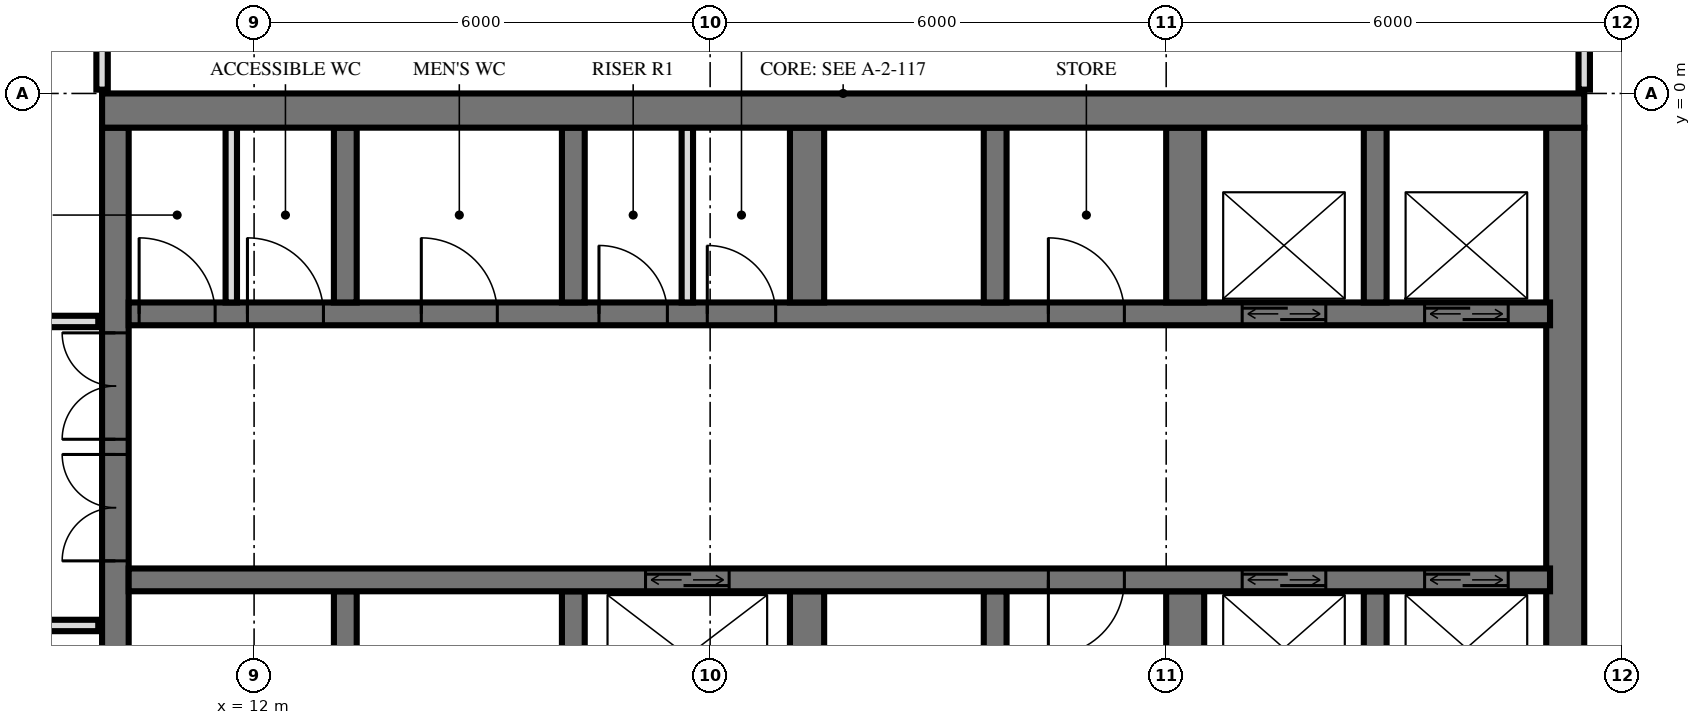
"""IFC4 building model, lengths in metres.
Left out: names, types, materials, properties, quantities, classifications, styles, units other than length and angle.
Written with IfcOpenShell. Run it as: python <this file> out.ifc"""

import sys

from ifc_helpers import new_model, si_unit, direction, frame, frame_2d, origin, place, context, subcontext, project, spatial, rectangle, extrude, element, fill, save


model = new_model("IFC4")
c1 = context("Model", 3, precision=1e-05, world=origin(), true_north=direction((0.0, 1.0)))
c2 = subcontext(c1, "Body", "Model", "MODEL_VIEW")
j1 = project(units=[si_unit("LENGTHUNIT", "METRE"), si_unit("PLANEANGLEUNIT", "RADIAN")], contexts=[c1])
p1 = place(None, origin())
s1 = spatial("IfcSite", under=j1, at=p1, CompositionType="ELEMENT")
p2 = place(p1, origin())
s2 = spatial("IfcBuilding", under=s1, at=p2, CompositionType="ELEMENT")
p3 = place(p2, frame((0.0, 0.0, 24.0)))
s3 = spatial("IfcBuildingStorey", under=s2, at=p3, CompositionType="ELEMENT", Elevation=24.0)
p4 = place(p3, frame((10.0, -0.225, 0.0), z_axis=(0.0, 0.0, 1.0), x_axis=(1.0, 0.0, 0.0)))
e1 = element("IfcWall", 1, at=p4, inside=s3, PredefinedType="SHEAR", context=c2, shape_type="SweptSolid", body=[
    extrude(rectangle(XDim=19.5, YDim=0.45, at=frame_2d((9.75, 0.0))), origin(), (0.0, 0.0, 1.0), 3.6),
])
p5 = place(p3, frame((10.175, -14.55, 0.0), z_axis=(0.0, 0.0, 1.0), x_axis=(0.0, 1.0, 0.0)))
e2 = element("IfcWall", 2, at=p5, inside=s3, PredefinedType="SHEAR", context=c2, shape_type="SweptSolid", body=[
    extrude(rectangle(XDim=14.1, YDim=0.35, at=frame_2d((7.05, 0.0))), origin(), (0.0, 0.0, 1.0), 3.6),
])
p6 = place(p5, frame((8.4, 0.0, 0.0)))
e3 = element("IfcOpeningElement", 3, at=p6, cuts=e2, PredefinedType="OPENING", context=c2, shape_type="SweptSolid", body=[
    extrude(rectangle(XDim=1.4, YDim=2.4, at=frame_2d((0.7, 1.2))), frame((0.0, 0.185, 0.0), z_axis=(0.0, -1.0, 0.0), x_axis=(1.0, 0.0, 0.0)), (0.0, 0.0, 1.0), 0.37),
])
p7 = place(p5, frame((10.0, 0.0, 0.0)))
e4 = element("IfcOpeningElement", 4, at=p7, cuts=e2, PredefinedType="OPENING", context=c2, shape_type="SweptSolid", body=[
    extrude(rectangle(XDim=1.4, YDim=2.4, at=frame_2d((0.7, 1.2))), frame((0.0, 0.185, 0.0), z_axis=(0.0, -1.0, 0.0), x_axis=(1.0, 0.0, 0.0)), (0.0, 0.0, 1.0), 0.37),
])
p8 = place(p5, frame((4.0, 0.0, 0.0)))
e5 = element("IfcOpeningElement", 5, at=p8, cuts=e2, PredefinedType="OPENING", context=c2, shape_type="SweptSolid", body=[
    extrude(rectangle(XDim=1.2, YDim=2.1, at=frame_2d((0.6, 1.05))), frame((0.0, 0.185, 0.0), z_axis=(0.0, -1.0, 0.0), x_axis=(1.0, 0.0, 0.0)), (0.0, 0.0, 1.0), 0.37),
])
p9 = place(p3, frame((29.25, -14.55, 0.0), z_axis=(0.0, 0.0, 1.0), x_axis=(0.0, 1.0, 0.0)))
e6 = element("IfcWall", 6, at=p9, inside=s3, PredefinedType="SHEAR", context=c2, shape_type="SweptSolid", body=[
    extrude(rectangle(XDim=14.1, YDim=0.5, at=frame_2d((7.05, 0.0))), origin(), (0.0, 0.0, 1.0), 3.6),
])
p10 = place(p3, frame((10.35, -2.9, 0.0), z_axis=(0.0, 0.0, 1.0), x_axis=(1.0, 0.0, 0.0)))
e7 = element("IfcWall", 7, at=p10, inside=s3, PredefinedType="SHEAR", context=c2, shape_type="SweptSolid", body=[
    extrude(rectangle(XDim=18.7, YDim=0.3, at=frame_2d((9.35, 0.0))), origin(), (0.0, 0.0, 1.0), 3.6),
])
p11 = place(p10, frame((14.65, 0.0, 0.0)))
e8 = element("IfcOpeningElement", 8, at=p11, cuts=e7, PredefinedType="OPENING", context=c2, shape_type="SweptSolid", body=[
    extrude(rectangle(XDim=1.1, YDim=2.1, at=frame_2d((0.55, 1.05))), frame((0.0, 0.16, 0.0), z_axis=(0.0, -1.0, 0.0), x_axis=(1.0, 0.0, 0.0)), (0.0, 0.0, 1.0), 0.32),
])
p12 = place(p10, frame((17.05, 0.0, 0.0)))
e9 = element("IfcOpeningElement", 9, at=p12, cuts=e7, PredefinedType="OPENING", context=c2, shape_type="SweptSolid", body=[
    extrude(rectangle(XDim=1.1, YDim=2.1, at=frame_2d((0.55, 1.05))), frame((0.0, 0.16, 0.0), z_axis=(0.0, -1.0, 0.0), x_axis=(1.0, 0.0, 0.0)), (0.0, 0.0, 1.0), 0.32),
])
p13 = place(p10, frame((6.188, 0.0, 0.0)))
e10 = element("IfcOpeningElement", 10, at=p13, cuts=e7, PredefinedType="OPENING", context=c2, shape_type="SweptSolid", body=[
    extrude(rectangle(XDim=0.9, YDim=2.1, at=frame_2d((0.45, 1.05))), frame((0.0, 0.16, 0.0), z_axis=(0.0, -1.0, 0.0), x_axis=(1.0, 0.0, 0.0)), (0.0, 0.0, 1.0), 0.32),
])
p14 = place(p10, frame((7.613, 0.0, 0.0)))
e11 = element("IfcOpeningElement", 11, at=p14, cuts=e7, PredefinedType="OPENING", context=c2, shape_type="SweptSolid", body=[
    extrude(rectangle(XDim=0.9, YDim=2.1, at=frame_2d((0.45, 1.05))), frame((0.0, 0.16, 0.0), z_axis=(0.0, -1.0, 0.0), x_axis=(1.0, 0.0, 0.0)), (0.0, 0.0, 1.0), 0.32),
])
p15 = place(p10, frame((0.137, 0.0, 0.0)))
e12 = element("IfcOpeningElement", 12, at=p15, cuts=e7, PredefinedType="OPENING", context=c2, shape_type="SweptSolid", body=[
    extrude(rectangle(XDim=1.0, YDim=2.1, at=frame_2d((0.5, 1.05))), frame((0.0, 0.16, 0.0), z_axis=(0.0, -1.0, 0.0), x_axis=(1.0, 0.0, 0.0)), (0.0, 0.0, 1.0), 0.32),
])
p16 = place(p10, frame((1.562, 0.0, 0.0)))
e13 = element("IfcOpeningElement", 13, at=p16, cuts=e7, PredefinedType="OPENING", context=c2, shape_type="SweptSolid", body=[
    extrude(rectangle(XDim=1.0, YDim=2.1, at=frame_2d((0.5, 1.05))), frame((0.0, 0.16, 0.0), z_axis=(0.0, -1.0, 0.0), x_axis=(1.0, 0.0, 0.0)), (0.0, 0.0, 1.0), 0.32),
])
p17 = place(p10, frame((3.85, 0.0, 0.0)))
e14 = element("IfcOpeningElement", 14, at=p17, cuts=e7, PredefinedType="OPENING", context=c2, shape_type="SweptSolid", body=[
    extrude(rectangle(XDim=1.0, YDim=2.1, at=frame_2d((0.5, 1.05))), frame((0.0, 0.16, 0.0), z_axis=(0.0, -1.0, 0.0), x_axis=(1.0, 0.0, 0.0)), (0.0, 0.0, 1.0), 0.32),
])
p18 = place(p10, frame((12.1, 0.0, 0.0)))
e15 = element("IfcOpeningElement", 15, at=p18, cuts=e7, PredefinedType="OPENING", context=c2, shape_type="SweptSolid", body=[
    extrude(rectangle(XDim=1.0, YDim=2.1, at=frame_2d((0.5, 1.05))), frame((0.0, 0.16, 0.0), z_axis=(0.0, -1.0, 0.0), x_axis=(1.0, 0.0, 0.0)), (0.0, 0.0, 1.0), 0.32),
])
p19 = place(p3, frame((10.35, -6.4, 0.0), z_axis=(0.0, 0.0, 1.0), x_axis=(1.0, 0.0, 0.0)))
e16 = element("IfcWall", 16, at=p19, inside=s3, PredefinedType="SHEAR", context=c2, shape_type="SweptSolid", body=[
    extrude(rectangle(XDim=18.7, YDim=0.3, at=frame_2d((9.35, 0.0))), origin(), (0.0, 0.0, 1.0), 3.6),
])
p20 = place(p19, frame((14.65, 0.0, 0.0)))
e17 = element("IfcOpeningElement", 17, at=p20, cuts=e16, PredefinedType="OPENING", context=c2, shape_type="SweptSolid", body=[
    extrude(rectangle(XDim=1.1, YDim=2.1, at=frame_2d((0.55, 1.05))), frame((0.0, 0.16, 0.0), z_axis=(0.0, -1.0, 0.0), x_axis=(1.0, 0.0, 0.0)), (0.0, 0.0, 1.0), 0.32),
])
p21 = place(p19, frame((17.05, 0.0, 0.0)))
e18 = element("IfcOpeningElement", 18, at=p21, cuts=e16, PredefinedType="OPENING", context=c2, shape_type="SweptSolid", body=[
    extrude(rectangle(XDim=1.1, YDim=2.1, at=frame_2d((0.55, 1.05))), frame((0.0, 0.16, 0.0), z_axis=(0.0, -1.0, 0.0), x_axis=(1.0, 0.0, 0.0)), (0.0, 0.0, 1.0), 0.32),
])
p22 = place(p19, frame((6.8, 0.0, 0.0)))
e19 = element("IfcOpeningElement", 19, at=p22, cuts=e16, PredefinedType="OPENING", context=c2, shape_type="SweptSolid", body=[
    extrude(rectangle(XDim=1.1, YDim=2.1, at=frame_2d((0.55, 1.05))), frame((0.0, 0.16, 0.0), z_axis=(0.0, -1.0, 0.0), x_axis=(1.0, 0.0, 0.0)), (0.0, 0.0, 1.0), 0.32),
])
p23 = place(p19, frame((12.1, 0.0, 0.0)))
e20 = element("IfcOpeningElement", 20, at=p23, cuts=e16, PredefinedType="OPENING", context=c2, shape_type="SweptSolid", body=[
    extrude(rectangle(XDim=1.0, YDim=2.1, at=frame_2d((0.5, 1.05))), frame((0.0, 0.16, 0.0), z_axis=(0.0, -1.0, 0.0), x_axis=(1.0, 0.0, 0.0)), (0.0, 0.0, 1.0), 0.32),
])
for number, where, z_axis, x_axis in (
    (21, (13.2, -2.75, 0.0), (0.0, 0.0, 1.0), (0.0, 1.0, 0.0)),
    (22, (13.2, -8.85, 0.0), (0.0, 0.0, 1.0), (0.0, 1.0, 0.0)),
    (23, (16.2, -2.75, 0.0), (0.0, 0.0, 1.0), (0.0, 1.0, 0.0)),
    (24, (16.2, -8.85, 0.0), (0.0, 0.0, 1.0), (0.0, 1.0, 0.0)),
):
    element("IfcWall", number, at=place(p3, frame(where, z_axis=z_axis, x_axis=x_axis)), inside=s3, PredefinedType="SHEAR", context=c2, shape_type="SweptSolid", body=[
        extrude(rectangle(XDim=2.3, YDim=0.3, at=frame_2d((1.15, 0.0))), origin(), (0.0, 0.0, 1.0), 3.6),
    ])
for number, where, z_axis, x_axis in (
    (25, (19.275, -2.75, 0.0), (0.0, 0.0, 1.0), (0.0, 1.0, 0.0)),
    (26, (19.275, -8.85, 0.0), (0.0, 0.0, 1.0), (0.0, 1.0, 0.0)),
):
    element("IfcWall", number, at=place(p3, frame(where, z_axis=z_axis, x_axis=x_axis)), inside=s3, PredefinedType="SHEAR", context=c2, shape_type="SweptSolid", body=[
        extrude(rectangle(XDim=2.3, YDim=0.45, at=frame_2d((1.15, 0.0))), origin(), (0.0, 0.0, 1.0), 3.6),
    ])
for number, where, z_axis, x_axis in (
    (27, (21.75, -2.75, 0.0), (0.0, 0.0, 1.0), (0.0, 1.0, 0.0)),
    (28, (21.75, -8.85, 0.0), (0.0, 0.0, 1.0), (0.0, 1.0, 0.0)),
):
    element("IfcWall", number, at=place(p3, frame(where, z_axis=z_axis, x_axis=x_axis)), inside=s3, PredefinedType="SHEAR", context=c2, shape_type="SweptSolid", body=[
        extrude(rectangle(XDim=2.3, YDim=0.3, at=frame_2d((1.15, 0.0))), origin(), (0.0, 0.0, 1.0), 3.6),
    ])
for number, where, z_axis, x_axis in (
    (29, (24.25, -2.75, 0.0), (0.0, 0.0, 1.0), (0.0, 1.0, 0.0)),
    (30, (24.25, -8.85, 0.0), (0.0, 0.0, 1.0), (0.0, 1.0, 0.0)),
):
    element("IfcWall", number, at=place(p3, frame(where, z_axis=z_axis, x_axis=x_axis)), inside=s3, PredefinedType="SHEAR", context=c2, shape_type="SweptSolid", body=[
        extrude(rectangle(XDim=2.3, YDim=0.5, at=frame_2d((1.15, 0.0))), origin(), (0.0, 0.0, 1.0), 3.6),
    ])
for number, where, z_axis, x_axis in (
    (31, (26.75, -2.75, 0.0), (0.0, 0.0, 1.0), (0.0, 1.0, 0.0)),
    (32, (26.75, -8.85, 0.0), (0.0, 0.0, 1.0), (0.0, 1.0, 0.0)),
):
    element("IfcWall", number, at=place(p3, frame(where, z_axis=z_axis, x_axis=x_axis)), inside=s3, PredefinedType="SHEAR", context=c2, shape_type="SweptSolid", body=[
        extrude(rectangle(XDim=2.3, YDim=0.3, at=frame_2d((1.15, 0.0))), origin(), (0.0, 0.0, 1.0), 3.6),
    ])
for number, where, z_axis, x_axis in (
    (33, (17.7, -2.75, 0.0), (0.0, 0.0, 1.0), (0.0, 1.0, 0.0)),
    (34, (11.7, -2.75, 0.0), (0.0, 0.0, 1.0), (0.0, 1.0, 0.0)),
):
    element("IfcWall", number, at=place(p3, frame(where, z_axis=z_axis, x_axis=x_axis)), inside=s3, PredefinedType="PARTITIONING", context=c2, shape_type="SweptSolid", body=[
        extrude(rectangle(XDim=2.3, YDim=0.15, at=frame_2d((1.15, 0.0))), origin(), (0.0, 0.0, 1.0), 3.3),
    ])
p24 = place(p3, frame((29.5, 0.05, 0.0), z_axis=(0.0, 0.0, 1.0), x_axis=(0.0, 1.0, 0.0)))
e35 = element("IfcWall", 35, at=p24, inside=s3, PredefinedType="PARTITIONING", context=c2, shape_type="SweptSolid", body=[
    extrude(rectangle(XDim=0.827, YDim=0.15, at=frame_2d((0.414, 0.0))), origin(), (0.0, 0.0, 1.0), 3.32),
])
p25 = place(p3, frame((10.0, 0.05, 0.0), z_axis=(0.0, 0.0, 1.0), x_axis=(0.0, 1.0, 0.0)))
e36 = element("IfcWall", 36, at=p25, inside=s3, PredefinedType="PARTITIONING", context=c2, shape_type="SweptSolid", body=[
    extrude(rectangle(XDim=0.97, YDim=0.15, at=frame_2d((0.485, 0.0))), origin(), (0.0, 0.0, 1.0), 3.32),
])
p26 = place(p3, frame((-9.95, -7.0, 0.0), z_axis=(0.0, 0.0, 1.0), x_axis=(1.0, 0.0, 0.0)))
e37 = element("IfcWall", 37, at=p26, inside=s3, PredefinedType="PARTITIONING", context=c2, shape_type="SweptSolid", body=[
    extrude(rectangle(XDim=19.9, YDim=0.15, at=frame_2d((9.95, 0.0))), origin(), (0.0, 0.0, 1.0), 3.32),
])
p27 = place(p26, frame((9.45, 0.0, 0.0)))
e38 = element("IfcOpeningElement", 38, at=p27, cuts=e37, PredefinedType="OPENING", context=c2, shape_type="SweptSolid", body=[
    extrude(rectangle(XDim=1.0, YDim=2.1, at=frame_2d((0.5, 1.05))), frame((0.0, 0.085, 0.0), z_axis=(0.0, -1.0, 0.0), x_axis=(1.0, 0.0, 0.0)), (0.0, 0.0, 1.0), 0.17),
])
p28 = place(p26, frame((3.45, 0.0, 0.0)))
e39 = element("IfcOpeningElement", 39, at=p28, cuts=e37, PredefinedType="OPENING", context=c2, shape_type="SweptSolid", body=[
    extrude(rectangle(XDim=1.0, YDim=2.1, at=frame_2d((0.5, 1.05))), frame((0.0, 0.085, 0.0), z_axis=(0.0, -1.0, 0.0), x_axis=(1.0, 0.0, 0.0)), (0.0, 0.0, 1.0), 0.17),
])
p29 = place(p3, frame((-9.95, -3.0, 0.0), z_axis=(0.0, 0.0, 1.0), x_axis=(1.0, 0.0, 0.0)))
e40 = element("IfcWall", 40, at=p29, inside=s3, PredefinedType="PARTITIONING", context=c2, shape_type="SweptSolid", body=[
    extrude(rectangle(XDim=19.9, YDim=0.15, at=frame_2d((9.95, 0.0))), origin(), (0.0, 0.0, 1.0), 3.32),
])
p30 = place(p29, frame((0.95, 0.0, 0.0)))
e41 = element("IfcOpeningElement", 41, at=p30, cuts=e40, PredefinedType="OPENING", context=c2, shape_type="SweptSolid", body=[
    extrude(rectangle(XDim=1.0, YDim=2.1, at=frame_2d((0.5, 1.05))), frame((0.0, 0.085, 0.0), z_axis=(0.0, -1.0, 0.0), x_axis=(1.0, 0.0, 0.0)), (0.0, 0.0, 1.0), 0.17),
])
p31 = place(p29, frame((3.7, 0.0, 0.0)))
e42 = element("IfcOpeningElement", 42, at=p31, cuts=e40, PredefinedType="OPENING", context=c2, shape_type="SweptSolid", body=[
    extrude(rectangle(XDim=1.0, YDim=2.1, at=frame_2d((0.5, 1.05))), frame((0.0, 0.085, 0.0), z_axis=(0.0, -1.0, 0.0), x_axis=(1.0, 0.0, 0.0)), (0.0, 0.0, 1.0), 0.17),
])
p32 = place(p29, frame((8.45, 0.0, 0.0)))
e43 = element("IfcOpeningElement", 43, at=p32, cuts=e40, PredefinedType="OPENING", context=c2, shape_type="SweptSolid", body=[
    extrude(rectangle(XDim=1.0, YDim=2.1, at=frame_2d((0.5, 1.05))), frame((0.0, 0.085, 0.0), z_axis=(0.0, -1.0, 0.0), x_axis=(1.0, 0.0, 0.0)), (0.0, 0.0, 1.0), 0.17),
])
p33 = place(p29, frame((15.7, 0.0, 0.0)))
e44 = element("IfcOpeningElement", 44, at=p33, cuts=e40, PredefinedType="OPENING", context=c2, shape_type="SweptSolid", body=[
    extrude(rectangle(XDim=1.0, YDim=2.1, at=frame_2d((0.5, 1.05))), frame((0.0, 0.085, 0.0), z_axis=(0.0, -1.0, 0.0), x_axis=(1.0, 0.0, 0.0)), (0.0, 0.0, 1.0), 0.17),
])
p34 = place(p11, origin())
e45 = element("IfcDoor", 45, at=p34, inside=s3, OperationType="DOUBLE_DOOR_SLIDING", PredefinedType="USERDEFINED", context=c2, shape_type="SweptSolid", body=[
    extrude(rectangle(XDim=1.1, YDim=2.1, at=frame_2d((0.55, 1.05))), frame((0.0, 0.025, 0.0), z_axis=(0.0, -1.0, 0.0), x_axis=(1.0, 0.0, 0.0)), (0.0, 0.0, 1.0), 0.05),
])
fill(e8, e45)
p35 = place(p12, origin())
e46 = element("IfcDoor", 46, at=p35, inside=s3, OperationType="DOUBLE_DOOR_SLIDING", PredefinedType="USERDEFINED", context=c2, shape_type="SweptSolid", body=[
    extrude(rectangle(XDim=1.1, YDim=2.1, at=frame_2d((0.55, 1.05))), frame((0.0, 0.025, 0.0), z_axis=(0.0, -1.0, 0.0), x_axis=(1.0, 0.0, 0.0)), (0.0, 0.0, 1.0), 0.05),
])
fill(e9, e46)
p36 = place(p20, origin())
e47 = element("IfcDoor", 47, at=p36, inside=s3, OperationType="DOUBLE_DOOR_SLIDING", PredefinedType="USERDEFINED", context=c2, shape_type="SweptSolid", body=[
    extrude(rectangle(XDim=1.1, YDim=2.1, at=frame_2d((0.55, 1.05))), frame((0.0, 0.025, 0.0), z_axis=(0.0, -1.0, 0.0), x_axis=(1.0, 0.0, 0.0)), (0.0, 0.0, 1.0), 0.05),
])
fill(e17, e47)
p37 = place(p21, origin())
e48 = element("IfcDoor", 48, at=p37, inside=s3, OperationType="DOUBLE_DOOR_SLIDING", PredefinedType="USERDEFINED", context=c2, shape_type="SweptSolid", body=[
    extrude(rectangle(XDim=1.1, YDim=2.1, at=frame_2d((0.55, 1.05))), frame((0.0, 0.025, 0.0), z_axis=(0.0, -1.0, 0.0), x_axis=(1.0, 0.0, 0.0)), (0.0, 0.0, 1.0), 0.05),
])
fill(e18, e48)
p38 = place(p22, origin())
e49 = element("IfcDoor", 49, at=p38, inside=s3, OperationType="DOUBLE_DOOR_SLIDING", PredefinedType="USERDEFINED", context=c2, shape_type="SweptSolid", body=[
    extrude(rectangle(XDim=1.1, YDim=2.1, at=frame_2d((0.55, 1.05))), frame((0.0, 0.025, 0.0), z_axis=(0.0, -1.0, 0.0), x_axis=(1.0, 0.0, 0.0)), (0.0, 0.0, 1.0), 0.05),
])
fill(e19, e49)
p39 = place(p6, origin())
e50 = element("IfcDoor", 50, at=p39, inside=s3, OperationType="DOUBLE_DOOR_SINGLE_SWING", PredefinedType="DOOR", context=c2, shape_type="SweptSolid", body=[
    extrude(rectangle(XDim=1.4, YDim=2.4, at=frame_2d((0.7, 1.2))), frame((0.0, 0.025, 0.0), z_axis=(0.0, -1.0, 0.0), x_axis=(1.0, 0.0, 0.0)), (0.0, 0.0, 1.0), 0.05),
])
fill(e3, e50)
p40 = place(p7, origin())
e51 = element("IfcDoor", 51, at=p40, inside=s3, OperationType="DOUBLE_DOOR_SINGLE_SWING", PredefinedType="DOOR", context=c2, shape_type="SweptSolid", body=[
    extrude(rectangle(XDim=1.4, YDim=2.4, at=frame_2d((0.7, 1.2))), frame((0.0, 0.025, 0.0), z_axis=(0.0, -1.0, 0.0), x_axis=(1.0, 0.0, 0.0)), (0.0, 0.0, 1.0), 0.05),
])
fill(e4, e51)
p41 = place(p13, origin())
e52 = element("IfcDoor", 52, at=p41, inside=s3, OperationType="SINGLE_SWING_RIGHT", PredefinedType="DOOR", context=c2, shape_type="SweptSolid", body=[
    extrude(rectangle(XDim=0.9, YDim=2.1, at=frame_2d((0.45, 1.05))), frame((0.0, 0.025, 0.0), z_axis=(0.0, -1.0, 0.0), x_axis=(1.0, 0.0, 0.0)), (0.0, 0.0, 1.0), 0.05),
])
fill(e10, e52)
p42 = place(p14, origin())
e53 = element("IfcDoor", 53, at=p42, inside=s3, OperationType="SINGLE_SWING_RIGHT", PredefinedType="DOOR", context=c2, shape_type="SweptSolid", body=[
    extrude(rectangle(XDim=0.9, YDim=2.1, at=frame_2d((0.45, 1.05))), frame((0.0, 0.025, 0.0), z_axis=(0.0, -1.0, 0.0), x_axis=(1.0, 0.0, 0.0)), (0.0, 0.0, 1.0), 0.05),
])
fill(e11, e53)
p43 = place(p15, origin())
e54 = element("IfcDoor", 54, at=p43, inside=s3, OperationType="SINGLE_SWING_RIGHT", PredefinedType="DOOR", context=c2, shape_type="SweptSolid", body=[
    extrude(rectangle(XDim=1.0, YDim=2.1, at=frame_2d((0.5, 1.05))), frame((0.0, 0.025, 0.0), z_axis=(0.0, -1.0, 0.0), x_axis=(1.0, 0.0, 0.0)), (0.0, 0.0, 1.0), 0.05),
])
fill(e12, e54)
p44 = place(p16, origin())
e55 = element("IfcDoor", 55, at=p44, inside=s3, OperationType="SINGLE_SWING_RIGHT", PredefinedType="DOOR", context=c2, shape_type="SweptSolid", body=[
    extrude(rectangle(XDim=1.0, YDim=2.1, at=frame_2d((0.5, 1.05))), frame((0.0, 0.025, 0.0), z_axis=(0.0, -1.0, 0.0), x_axis=(1.0, 0.0, 0.0)), (0.0, 0.0, 1.0), 0.05),
])
fill(e13, e55)
p45 = place(p17, origin())
e56 = element("IfcDoor", 56, at=p45, inside=s3, OperationType="SINGLE_SWING_RIGHT", PredefinedType="DOOR", context=c2, shape_type="SweptSolid", body=[
    extrude(rectangle(XDim=1.0, YDim=2.1, at=frame_2d((0.5, 1.05))), frame((0.0, 0.025, 0.0), z_axis=(0.0, -1.0, 0.0), x_axis=(1.0, 0.0, 0.0)), (0.0, 0.0, 1.0), 0.05),
])
fill(e14, e56)
p46 = place(p18, origin())
e57 = element("IfcDoor", 57, at=p46, inside=s3, OperationType="SINGLE_SWING_RIGHT", PredefinedType="DOOR", context=c2, shape_type="SweptSolid", body=[
    extrude(rectangle(XDim=1.0, YDim=2.1, at=frame_2d((0.5, 1.05))), frame((0.0, 0.025, 0.0), z_axis=(0.0, -1.0, 0.0), x_axis=(1.0, 0.0, 0.0)), (0.0, 0.0, 1.0), 0.05),
])
fill(e15, e57)
p47 = place(p23, frame((0.5, 0.0, 0.0), z_axis=(0.0, 0.0, 1.0), x_axis=(-1.0, 0.0, 0.0)))
e58 = element("IfcDoor", 58, at=p47, inside=s3, OperationType="SINGLE_SWING_LEFT", PredefinedType="DOOR", context=c2, shape_type="SweptSolid", body=[
    extrude(rectangle(XDim=1.0, YDim=2.1, at=frame_2d((0.0, 1.05))), frame((0.0, -0.025, 0.0), z_axis=(0.0, 1.0, 0.0), x_axis=(-1.0, 0.0, 0.0)), (0.0, 0.0, 1.0), 0.05),
])
fill(e20, e58)
save(model, sys.argv[1])
